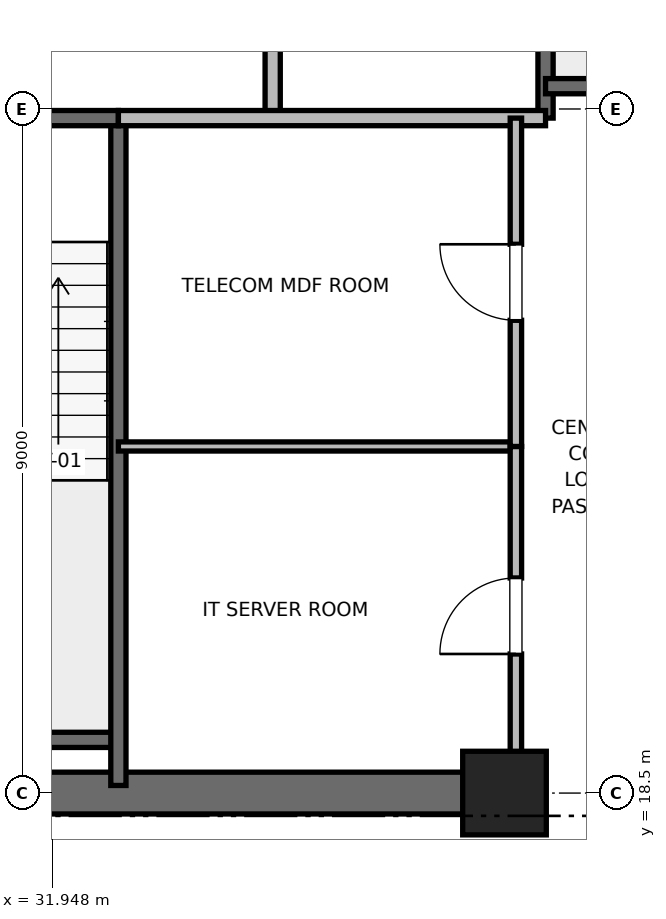
"""IFC4 building model, lengths in metres.
Left out: names, types, materials, properties, quantities, classifications, styles, units other than length and angle.
Written with IfcOpenShell. Run it as: python <this file> out.ifc"""

import sys

from ifc_helpers import new_model, si_unit, direction, frame, frame_2d, origin, origin_2d, place, context, subcontext, project, spatial, rectangle, extrude, element, fill, save


model = new_model("IFC4")
c1 = context("Model", 3, precision=1e-05, world=origin(), true_north=direction((0.0, 1.0)))
c2 = subcontext(c1, "Body", "Model", "MODEL_VIEW")
j1 = project(units=[si_unit("LENGTHUNIT", "METRE"), si_unit("PLANEANGLEUNIT", "RADIAN")], contexts=[c1])
p1 = place(None, origin())
s1 = spatial("IfcSite", under=j1, at=p1, CompositionType="ELEMENT")
p2 = place(p1, origin())
s2 = spatial("IfcBuilding", under=s1, at=p2, CompositionType="ELEMENT")
p3 = place(p2, frame((0.0, 0.0, 180.4)))
s3 = spatial("IfcBuildingStorey", under=s2, at=p3, CompositionType="ELEMENT", Elevation=180.4)
p4 = place(p3, frame((37.9, 18.5, 0.0), z_axis=(0.0, 0.0, 1.0), x_axis=(1.0, 0.0, 0.0)))
e1 = element("IfcColumn", 1, at=p4, inside=s3, PredefinedType="PILASTER", context=c2, shape_type="SweptSolid", body=[
    extrude(rectangle(XDim=1.1, YDim=1.1, at=origin_2d()), origin(), (0.0, 0.0, 1.0), 4.0),
])
p5 = place(p3, frame((29.0, 18.5, 0.0), z_axis=(0.0, 0.0, 1.0), x_axis=(1.0, 0.0, 0.0)))
e2 = element("IfcWall", 2, at=p5, inside=s3, PredefinedType="SHEAR", context=c2, shape_type="SweptSolid", body=[
    extrude(rectangle(XDim=9.2, YDim=0.55, at=frame_2d((4.6, 0.0))), origin(), (0.0, 0.0, 1.0), 3.7),
])
p6 = place(p3, frame((29.7, 19.2, 0.0), z_axis=(0.0, 0.0, 1.0), x_axis=(1.0, 0.0, 0.0)))
e3 = element("IfcWall", 3, at=p6, inside=s3, PredefinedType="SOLIDWALL", context=c2, shape_type="SweptSolid", body=[
    extrude(rectangle(XDim=3.12, YDim=0.2, at=frame_2d((1.56, 0.0))), origin(), (0.0, 0.0, 1.0), 3.7),
])
p7 = place(p3, frame((32.82, 18.6, 0.0), z_axis=(0.0, 0.0, 1.0), x_axis=(0.0, 1.0, 0.0)))
e4 = element("IfcWall", 4, at=p7, inside=s3, PredefinedType="SOLIDWALL", context=c2, shape_type="SweptSolid", body=[
    extrude(rectangle(XDim=8.78, YDim=0.2, at=frame_2d((4.39, 0.0))), origin(), (0.0, 0.0, 1.0), 3.7),
])
p8 = place(p3, frame((29.7, 27.38, 0.0), z_axis=(0.0, 0.0, 1.0), x_axis=(1.0, 0.0, 0.0)))
e5 = element("IfcWall", 5, at=p8, inside=s3, PredefinedType="SOLIDWALL", context=c2, shape_type="SweptSolid", body=[
    extrude(rectangle(XDim=3.12, YDim=0.2, at=frame_2d((1.56, 0.0))), origin(), (0.0, 0.0, 1.0), 3.7),
])
p9 = place(p8, frame((1.01, 0.0, 0.0)))
e6 = element("IfcOpeningElement", 6, at=p9, cuts=e5, PredefinedType="OPENING", context=c2, shape_type="SweptSolid", body=[
    extrude(rectangle(XDim=1.1, YDim=2.15, at=frame_2d((0.55, 1.075))), frame((0.0, 0.1, 0.0), z_axis=(0.0, -1.0, 0.0), x_axis=(1.0, 0.0, 0.0)), (0.0, 0.0, 1.0), 0.2),
])
p10 = place(p3, frame((38.44, 27.38, 0.0), z_axis=(0.0, 0.0, 1.0), x_axis=(0.0, 1.0, 0.0)))
e7 = element("IfcWall", 7, at=p10, inside=s3, PredefinedType="SOLIDWALL", context=c2, shape_type="SweptSolid", body=[
    extrude(rectangle(XDim=8.87, YDim=0.2, at=frame_2d((4.435, 0.0))), origin(), (0.0, 0.0, 1.0), 3.7),
])
p11 = place(p3, frame((38.44, 27.8, 0.0), z_axis=(0.0, 0.0, 1.0), x_axis=(1.0, 0.0, 0.0)))
e8 = element("IfcWall", 8, at=p11, inside=s3, PredefinedType="SOLIDWALL", context=c2, shape_type="SweptSolid", body=[
    extrude(rectangle(XDim=3.32, YDim=0.2, at=frame_2d((1.66, 0.0))), origin(), (0.0, 0.0, 1.0), 3.7),
])
p12 = place(p3, frame((34.85, 27.38, 0.0), z_axis=(0.0, 0.0, 1.0), x_axis=(0.0, 1.0, 0.0)))
e9 = element("IfcWall", 9, at=p12, inside=s3, PredefinedType="PARTITIONING", context=c2, shape_type="SweptSolid", body=[
    extrude(rectangle(XDim=3.37, YDim=0.2, at=frame_2d((1.685, 0.0))), origin(), (0.0, 0.0, 1.0), 3.7),
])
p13 = place(p12, frame((1.11, 0.0, 0.0)))
e10 = element("IfcOpeningElement", 10, at=p13, cuts=e9, PredefinedType="OPENING", context=c2, shape_type="SweptSolid", body=[
    extrude(rectangle(XDim=1.15, YDim=2.2, at=frame_2d((0.575, 1.1))), frame((0.0, 0.1, 0.0), z_axis=(0.0, -1.0, 0.0), x_axis=(1.0, 0.0, 0.0)), (0.0, 0.0, 1.0), 0.2),
])
p14 = place(p3, frame((32.82, 27.38, 0.0), z_axis=(0.0, 0.0, 1.0), x_axis=(1.0, 0.0, 0.0)))
e11 = element("IfcWall", 11, at=p14, inside=s3, PredefinedType="PARTITIONING", context=c2, shape_type="SweptSolid", body=[
    extrude(rectangle(XDim=5.62, YDim=0.2, at=frame_2d((2.81, 0.0))), origin(), (0.0, 0.0, 1.0), 3.7),
])
p15 = place(p3, frame((32.82, 23.06, 0.0), z_axis=(0.0, 0.0, 1.0), x_axis=(1.0, 0.0, 0.0)))
e12 = element("IfcWall", 12, at=p15, inside=s3, PredefinedType="PARTITIONING", context=c2, shape_type="SweptSolid", body=[
    extrude(rectangle(XDim=5.23, YDim=0.12, at=frame_2d((2.615, 0.0))), origin(), (0.0, 0.0, 1.0), 2.85),
])
p16 = place(p3, frame((38.05, 18.6, 0.0), z_axis=(0.0, 0.0, 1.0), x_axis=(0.0, 1.0, 0.0)))
e13 = element("IfcWall", 13, at=p16, inside=s3, PredefinedType="PARTITIONING", context=c2, shape_type="SweptSolid", body=[
    extrude(rectangle(XDim=4.46, YDim=0.15, at=frame_2d((2.23, 0.0))), origin(), (0.0, 0.0, 1.0), 2.68),
])
p17 = place(p16, frame((1.73, 0.0, 0.0)))
e14 = element("IfcOpeningElement", 14, at=p17, cuts=e13, PredefinedType="OPENING", context=c2, shape_type="SweptSolid", body=[
    extrude(rectangle(XDim=1.0, YDim=2.15, at=frame_2d((0.5, 1.075))), frame((0.0, 0.075, 0.0), z_axis=(0.0, -1.0, 0.0), x_axis=(1.0, 0.0, 0.0)), (0.0, 0.0, 1.0), 0.15),
])
p18 = place(p3, frame((38.05, 23.06, 0.0), z_axis=(0.0, 0.0, 1.0), x_axis=(0.0, 1.0, 0.0)))
e15 = element("IfcWall", 15, at=p18, inside=s3, PredefinedType="PARTITIONING", context=c2, shape_type="SweptSolid", body=[
    extrude(rectangle(XDim=4.32, YDim=0.15, at=frame_2d((2.16, 0.0))), origin(), (0.0, 0.0, 1.0), 2.85),
])
p19 = place(p18, frame((1.66, 0.0, 0.0)))
e16 = element("IfcOpeningElement", 16, at=p19, cuts=e15, PredefinedType="OPENING", context=c2, shape_type="SweptSolid", body=[
    extrude(rectangle(XDim=1.0, YDim=2.15, at=frame_2d((0.5, 1.075))), frame((0.0, 0.075, 0.0), z_axis=(0.0, -1.0, 0.0), x_axis=(1.0, 0.0, 0.0)), (0.0, 0.0, 1.0), 0.15),
])
p20 = place(p17, origin())
e17 = element("IfcDoor", 17, at=p20, inside=s3, OperationType="SINGLE_SWING_LEFT", PredefinedType="DOOR", context=c2, shape_type="SweptSolid", body=[
    extrude(rectangle(XDim=1.0, YDim=2.15, at=frame_2d((0.5, 1.075))), frame((0.0, 0.025, 0.0), z_axis=(0.0, -1.0, 0.0), x_axis=(1.0, 0.0, 0.0)), (0.0, 0.0, 1.0), 0.05),
])
fill(e14, e17)
p21 = place(p19, origin())
e18 = element("IfcDoor", 18, at=p21, inside=s3, OperationType="SINGLE_SWING_RIGHT", PredefinedType="DOOR", context=c2, shape_type="SweptSolid", body=[
    extrude(rectangle(XDim=1.0, YDim=2.15, at=frame_2d((0.5, 1.075))), frame((0.0, 0.025, 0.0), z_axis=(0.0, -1.0, 0.0), x_axis=(1.0, 0.0, 0.0)), (0.0, 0.0, 1.0), 0.05),
])
fill(e16, e18)
save(model, sys.argv[1])
